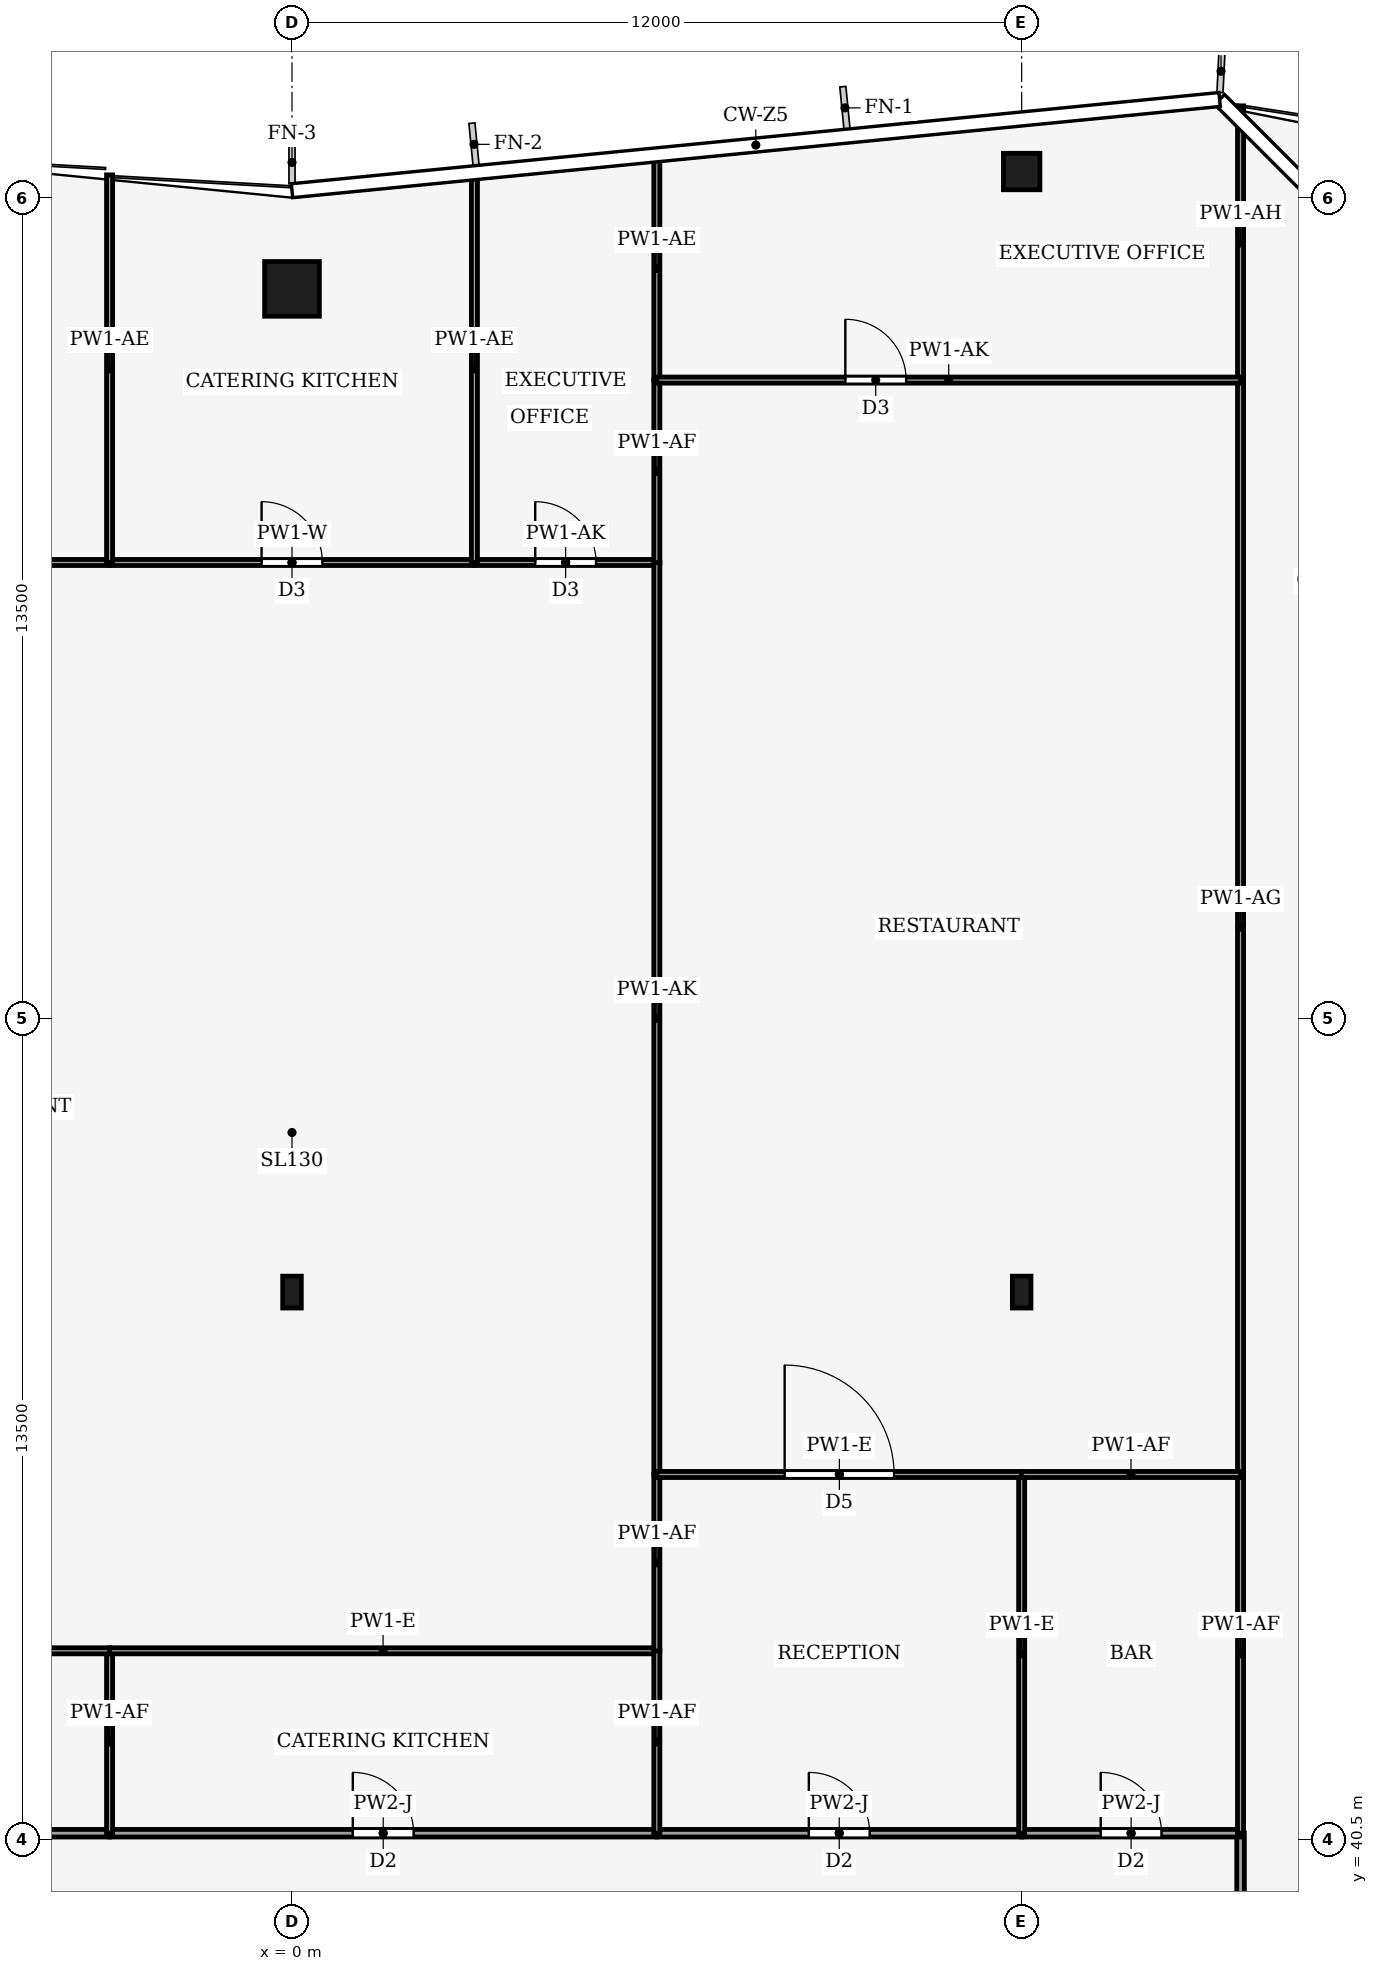
"""IFC4 building model, lengths in metres.
Left out: names, types, materials, properties, quantities, classifications, styles, units other than length and angle.
Written with IfcOpenShell. Run it as: python <this file> out.ifc"""

import sys

from ifc_helpers import new_model, si_unit, direction, frame, frame_2d, origin, origin_2d, place, context, subcontext, project, spatial, rectangle, hollow_rectangle, i_section, extrude, element, fill, save


model = new_model("IFC4")
c1 = context("Model", 3, precision=1e-05, world=origin(), true_north=direction((0.0, 1.0)))
c2 = subcontext(c1, "Body", "Model", "MODEL_VIEW")
j1 = project(units=[si_unit("LENGTHUNIT", "METRE"), si_unit("PLANEANGLEUNIT", "RADIAN")], contexts=[c1])
p1 = place(None, origin())
s1 = spatial("IfcSite", under=j1, at=p1, CompositionType="ELEMENT")
p2 = place(p1, origin())
s2 = spatial("IfcBuilding", under=s1, at=p2, CompositionType="ELEMENT")
p3 = place(p2, frame((0.0, 0.0, 330.0)))
s3 = spatial("IfcBuildingStorey", under=s2, at=p3, CompositionType="ELEMENT", Elevation=330.0)
p4 = place(p3, frame((0.0, 66.0, 0.0), z_axis=(0.0, 0.0, 1.0), x_axis=(1.0, 0.0, 0.0)))
e1 = element("IfcColumn", 1, at=p4, inside=s3, PredefinedType="COLUMN", context=c2, shape_type="SweptSolid", body=[
    extrude(hollow_rectangle(XDim=0.9, YDim=0.9, WallThickness=0.04, at=origin_2d()), origin(), (0.0, 0.0, 1.0), 4.0),
])
p5 = place(p3, frame((12.0, 67.93, 0.0), z_axis=(0.0, 0.0, 1.0), x_axis=(1.0, 0.0, 0.0)))
e2 = element("IfcColumn", 2, at=p5, inside=s3, PredefinedType="COLUMN", context=c2, shape_type="SweptSolid", body=[
    extrude(hollow_rectangle(XDim=0.6, YDim=0.6, WallThickness=0.025, at=origin_2d()), origin(), (0.0, 0.0, 1.0), 4.0),
])
for number, where, z_axis, x_axis in (
    (3, (0.0, 49.5, 0.0), (0.0, 0.0, 1.0), (1.0, 0.0, 0.0)),
    (4, (12.0, 49.5, 0.0), (0.0, 0.0, 1.0), (1.0, 0.0, 0.0)),
):
    element("IfcColumn", number, at=place(p3, frame(where, z_axis=z_axis, x_axis=x_axis)), inside=s3, PredefinedType="COLUMN", context=c2, shape_type="SweptSolid", body=[
        extrude(i_section(OverallWidth=0.306, OverallDepth=0.524, WebThickness=0.012, FlangeThickness=0.04, FilletRadius=0.027, at=origin_2d()), origin(), (0.0, 0.0, 1.0), 4.0),
    ])
p6 = place(p3, frame((15.6, 40.604, 0.0), z_axis=(0.0, 0.0, 1.0), x_axis=(0.0, -1.0, 0.0)))
e5 = element("IfcWall", 5, at=p6, inside=s3, PredefinedType="PARTITIONING", context=c2, shape_type="SweptSolid", body=[
    extrude(rectangle(XDim=6.104, YDim=0.125, at=frame_2d((3.052, 0.0))), origin(), (0.0, 0.0, 1.0), 3.09),
])
p7 = place(p6, frame((2.552, 0.0, 0.0)))
e6 = element("IfcOpeningElement", 6, at=p7, cuts=e5, PredefinedType="OPENING", context=c2, shape_type="SweptSolid", body=[
    extrude(rectangle(XDim=1.0, YDim=2.1, at=frame_2d((0.5, 1.05))), frame((0.0, 0.073, 0.0), z_axis=(0.0, -1.0, 0.0), x_axis=(1.0, 0.0, 0.0)), (0.0, 0.0, 1.0), 0.145),
])
p8 = place(p3, frame((-12.0, 40.6, 0.0), z_axis=(0.0, 0.0, 1.0), x_axis=(1.0, 0.0, 0.0)))
e7 = element("IfcWall", 7, at=p8, inside=s3, PredefinedType="PARTITIONING", context=c2, shape_type="SweptSolid", body=[
    extrude(rectangle(XDim=9.0, YDim=0.125, at=frame_2d((4.5, 0.0))), origin(), (0.0, 0.0, 1.0), 3.34),
])
p9 = place(p8, frame((4.0, 0.0, 0.0)))
e8 = element("IfcOpeningElement", 8, at=p9, cuts=e7, PredefinedType="OPENING", context=c2, shape_type="SweptSolid", body=[
    extrude(rectangle(XDim=1.0, YDim=2.1, at=frame_2d((0.5, 1.05))), frame((0.0, 0.073, 0.0), z_axis=(0.0, -1.0, 0.0), x_axis=(1.0, 0.0, 0.0)), (0.0, 0.0, 1.0), 0.145),
])
p10 = place(p3, frame((-3.0, 40.6, 0.0), z_axis=(0.0, 0.0, 1.0), x_axis=(1.0, 0.0, 0.0)))
e9 = element("IfcWall", 9, at=p10, inside=s3, PredefinedType="PARTITIONING", context=c2, shape_type="SweptSolid", body=[
    extrude(rectangle(XDim=9.0, YDim=0.125, at=frame_2d((4.5, 0.0))), origin(), (0.0, 0.0, 1.0), 3.34),
])
p11 = place(p10, frame((4.0, 0.0, 0.0)))
e10 = element("IfcOpeningElement", 10, at=p11, cuts=e9, PredefinedType="OPENING", context=c2, shape_type="SweptSolid", body=[
    extrude(rectangle(XDim=1.0, YDim=2.1, at=frame_2d((0.5, 1.05))), frame((0.0, 0.073, 0.0), z_axis=(0.0, -1.0, 0.0), x_axis=(1.0, 0.0, 0.0)), (0.0, 0.0, 1.0), 0.145),
])
p12 = place(p3, frame((6.0, 40.6, 0.0), z_axis=(0.0, 0.0, 1.0), x_axis=(1.0, 0.0, 0.0)))
e11 = element("IfcWall", 11, at=p12, inside=s3, PredefinedType="PARTITIONING", context=c2, shape_type="SweptSolid", body=[
    extrude(rectangle(XDim=6.0, YDim=0.125, at=frame_2d((3.0, 0.0))), origin(), (0.0, 0.0, 1.0), 3.34),
])
p13 = place(p12, frame((2.5, 0.0, 0.0)))
e12 = element("IfcOpeningElement", 12, at=p13, cuts=e11, PredefinedType="OPENING", context=c2, shape_type="SweptSolid", body=[
    extrude(rectangle(XDim=1.0, YDim=2.1, at=frame_2d((0.5, 1.05))), frame((0.0, 0.073, 0.0), z_axis=(0.0, -1.0, 0.0), x_axis=(1.0, 0.0, 0.0)), (0.0, 0.0, 1.0), 0.145),
])
p14 = place(p3, frame((12.0, 40.6, 0.0), z_axis=(0.0, 0.0, 1.0), x_axis=(1.0, 0.0, 0.0)))
e13 = element("IfcWall", 13, at=p14, inside=s3, PredefinedType="PARTITIONING", context=c2, shape_type="SweptSolid", body=[
    extrude(rectangle(XDim=3.6, YDim=0.125, at=frame_2d((1.8, 0.0))), origin(), (0.0, 0.0, 1.0), 3.34),
])
p15 = place(p14, frame((1.3, 0.0, 0.0)))
e14 = element("IfcOpeningElement", 14, at=p15, cuts=e13, PredefinedType="OPENING", context=c2, shape_type="SweptSolid", body=[
    extrude(rectangle(XDim=1.0, YDim=2.1, at=frame_2d((0.5, 1.05))), frame((0.0, 0.073, 0.0), z_axis=(0.0, -1.0, 0.0), x_axis=(1.0, 0.0, 0.0)), (0.0, 0.0, 1.0), 0.145),
])
p16 = place(p3, frame((15.6, 46.5, 0.0), z_axis=(0.0, 0.0, 1.0), x_axis=(0.0, -1.0, 0.0)))
e15 = element("IfcWall", 15, at=p16, inside=s3, PredefinedType="PARTITIONING", context=c2, shape_type="SweptSolid", body=[
    extrude(rectangle(XDim=5.9, YDim=0.1, at=frame_2d((2.95, 0.0))), origin(), (0.0, 0.0, 1.0), 3.82),
])
p17 = place(p3, frame((15.6, 64.5, 0.0), z_axis=(0.0, 0.0, 1.0), x_axis=(0.0, -1.0, 0.0)))
e16 = element("IfcWall", 16, at=p17, inside=s3, PredefinedType="PARTITIONING", context=c2, shape_type="SweptSolid", body=[
    extrude(rectangle(XDim=18.0, YDim=0.1, at=frame_2d((9.0, 0.0))), origin(), (0.0, 0.0, 1.0), 3.3),
])
p18 = place(p3, frame((15.6, 69.01, 0.0), z_axis=(0.0, 0.0, 1.0), x_axis=(0.0, -1.0, 0.0)))
e17 = element("IfcWall", 17, at=p18, inside=s3, PredefinedType="PARTITIONING", context=c2, shape_type="SweptSolid", body=[
    extrude(rectangle(XDim=4.51, YDim=0.1, at=frame_2d((2.255, 0.0))), origin(), (0.0, 0.0, 1.0), 2.88),
])
p19 = place(p3, frame((-3.0, 40.6, 0.0), z_axis=(0.0, 0.0, 1.0), x_axis=(0.0, 1.0, 0.0)))
e18 = element("IfcWall", 18, at=p19, inside=s3, PredefinedType="PARTITIONING", context=c2, shape_type="SweptSolid", body=[
    extrude(rectangle(XDim=3.0, YDim=0.1, at=frame_2d((1.5, 0.0))), origin(), (0.0, 0.0, 1.0), 3.82),
])
p20 = place(p3, frame((-2.996, 43.6, 0.0), z_axis=(0.0, 0.0, 1.0), x_axis=(-1.0, 0.0, 0.0)))
e19 = element("IfcWall", 19, at=p20, inside=s3, PredefinedType="PARTITIONING", context=c2, shape_type="SweptSolid", body=[
    extrude(rectangle(XDim=9.008, YDim=0.1, at=frame_2d((4.504, 0.0))), origin(), (0.0, 0.0, 1.0), 3.34),
])
p21 = place(p3, frame((6.0, 43.6, 0.0), z_axis=(0.0, 0.0, 1.0), x_axis=(-1.0, 0.0, 0.0)))
e20 = element("IfcWall", 20, at=p21, inside=s3, PredefinedType="PARTITIONING", context=c2, shape_type="SweptSolid", body=[
    extrude(rectangle(XDim=9.004, YDim=0.1, at=frame_2d((4.502, 0.0))), origin(), (0.0, 0.0, 1.0), 3.34),
])
p22 = place(p3, frame((6.0, 40.6, 0.0), z_axis=(0.0, 0.0, 1.0), x_axis=(0.0, 1.0, 0.0)))
e21 = element("IfcWall", 21, at=p22, inside=s3, PredefinedType="PARTITIONING", context=c2, shape_type="SweptSolid", body=[
    extrude(rectangle(XDim=3.004, YDim=0.1, at=frame_2d((1.502, 0.0))), origin(), (0.0, 0.0, 1.0), 3.82),
])
p23 = place(p3, frame((-12.0, 61.5, 0.0), z_axis=(0.0, 0.0, 1.0), x_axis=(1.0, 0.0, 0.0)))
e22 = element("IfcWall", 22, at=p23, inside=s3, PredefinedType="PARTITIONING", context=c2, shape_type="SweptSolid", body=[
    extrude(rectangle(XDim=9.0, YDim=0.1, at=frame_2d((4.5, 0.0))), origin(), (0.0, 0.0, 1.0), 3.19),
])
p24 = place(p23, frame((4.0, 0.0, 0.0)))
e23 = element("IfcOpeningElement", 23, at=p24, cuts=e22, PredefinedType="OPENING", context=c2, shape_type="SweptSolid", body=[
    extrude(rectangle(XDim=1.0, YDim=2.1, at=frame_2d((0.5, 1.05))), frame((0.0, 0.06, 0.0), z_axis=(0.0, -1.0, 0.0), x_axis=(1.0, 0.0, 0.0)), (0.0, 0.0, 1.0), 0.12),
])
p25 = place(p3, frame((-3.0, 61.5, 0.0), z_axis=(0.0, 0.0, 1.0), x_axis=(1.0, 0.0, 0.0)))
e24 = element("IfcWall", 24, at=p25, inside=s3, PredefinedType="PARTITIONING", context=c2, shape_type="SweptSolid", body=[
    extrude(rectangle(XDim=6.0, YDim=0.1, at=frame_2d((3.0, 0.0))), origin(), (0.0, 0.0, 1.0), 3.24),
])
p26 = place(p25, frame((2.5, 0.0, 0.0)))
e25 = element("IfcOpeningElement", 25, at=p26, cuts=e24, PredefinedType="OPENING", context=c2, shape_type="SweptSolid", body=[
    extrude(rectangle(XDim=1.0, YDim=2.1, at=frame_2d((0.5, 1.05))), frame((0.0, 0.06, 0.0), z_axis=(0.0, -1.0, 0.0), x_axis=(1.0, 0.0, 0.0)), (0.0, 0.0, 1.0), 0.12),
])
p27 = place(p3, frame((3.0, 61.5, 0.0), z_axis=(0.0, 0.0, 1.0), x_axis=(1.0, 0.0, 0.0)))
e26 = element("IfcWall", 26, at=p27, inside=s3, PredefinedType="PARTITIONING", context=c2, shape_type="SweptSolid", body=[
    extrude(rectangle(XDim=3.0, YDim=0.1, at=frame_2d((1.5, 0.0))), origin(), (0.0, 0.0, 1.0), 3.19),
])
p28 = place(p27, frame((1.0, 0.0, 0.0)))
e27 = element("IfcOpeningElement", 27, at=p28, cuts=e26, PredefinedType="OPENING", context=c2, shape_type="SweptSolid", body=[
    extrude(rectangle(XDim=1.0, YDim=2.1, at=frame_2d((0.5, 1.05))), frame((0.0, 0.06, 0.0), z_axis=(0.0, -1.0, 0.0), x_axis=(1.0, 0.0, 0.0)), (0.0, 0.0, 1.0), 0.12),
])
p29 = place(p3, frame((6.0, 43.596, 0.0), z_axis=(0.0, 0.0, 1.0), x_axis=(0.0, 1.0, 0.0)))
e28 = element("IfcWall", 28, at=p29, inside=s3, PredefinedType="PARTITIONING", context=c2, shape_type="SweptSolid", body=[
    extrude(rectangle(XDim=2.904, YDim=0.1, at=frame_2d((1.452, 0.0))), origin(), (0.0, 0.0, 1.0), 3.82),
])
p30 = place(p3, frame((6.0, 46.5, 0.0), z_axis=(0.0, 0.0, 1.0), x_axis=(0.0, 1.0, 0.0)))
e29 = element("IfcWall", 29, at=p30, inside=s3, PredefinedType="PARTITIONING", context=c2, shape_type="SweptSolid", body=[
    extrude(rectangle(XDim=15.004, YDim=0.1, at=frame_2d((7.502, 0.0))), origin(), (0.0, 0.0, 1.0), 3.19),
])
for number, where, z_axis, x_axis in (
    (30, (-3.0, 61.5, 0.0), (0.0, 0.0, 1.0), (0.0, 1.0, 0.0)),
    (31, (3.0, 61.5, 0.0), (0.0, 0.0, 1.0), (0.0, 1.0, 0.0)),
):
    element("IfcWall", number, at=place(p3, frame(where, z_axis=z_axis, x_axis=x_axis)), inside=s3, PredefinedType="PARTITIONING", context=c2, shape_type="SweptSolid", body=[
        extrude(rectangle(XDim=6.375, YDim=0.1, at=frame_2d((3.188, 0.0))), origin(), (0.0, 0.0, 1.0), 2.99),
    ])
p31 = place(p3, frame((6.0, 61.496, 0.0), z_axis=(0.0, 0.0, 1.0), x_axis=(0.0, 1.0, 0.0)))
e32 = element("IfcWall", 32, at=p31, inside=s3, PredefinedType="PARTITIONING", context=c2, shape_type="SweptSolid", body=[
    extrude(rectangle(XDim=3.004, YDim=0.1, at=frame_2d((1.502, 0.0))), origin(), (0.0, 0.0, 1.0), 3.82),
])
p32 = place(p3, frame((6.0, 64.5, 0.0), z_axis=(0.0, 0.0, 1.0), x_axis=(0.0, 1.0, 0.0)))
e33 = element("IfcWall", 33, at=p32, inside=s3, PredefinedType="PARTITIONING", context=c2, shape_type="SweptSolid", body=[
    extrude(rectangle(XDim=3.67, YDim=0.1, at=frame_2d((1.835, 0.0))), origin(), (0.0, 0.0, 1.0), 2.99),
])
p33 = place(p3, frame((12.0, 40.6, 0.0), z_axis=(0.0, 0.0, 1.0), x_axis=(0.0, 1.0, 0.0)))
e34 = element("IfcWall", 34, at=p33, inside=s3, PredefinedType="PARTITIONING", context=c2, shape_type="SweptSolid", body=[
    extrude(rectangle(XDim=5.9, YDim=0.1, at=frame_2d((2.95, 0.0))), origin(), (0.0, 0.0, 1.0), 3.34),
])
p34 = place(p3, frame((6.0, 46.5, 0.0), z_axis=(0.0, 0.0, 1.0), x_axis=(1.0, 0.0, 0.0)))
e35 = element("IfcWall", 35, at=p34, inside=s3, PredefinedType="PARTITIONING", context=c2, shape_type="SweptSolid", body=[
    extrude(rectangle(XDim=6.004, YDim=0.1, at=frame_2d((3.002, 0.0))), origin(), (0.0, 0.0, 1.0), 3.34),
])
p35 = place(p34, frame((2.102, 0.0, 0.0)))
e36 = element("IfcOpeningElement", 36, at=p35, cuts=e35, PredefinedType="OPENING", context=c2, shape_type="SweptSolid", body=[
    extrude(rectangle(XDim=1.8, YDim=2.1, at=frame_2d((0.9, 1.05))), frame((0.0, 0.06, 0.0), z_axis=(0.0, -1.0, 0.0), x_axis=(1.0, 0.0, 0.0)), (0.0, 0.0, 1.0), 0.12),
])
p36 = place(p3, frame((15.6, 46.5, 0.0), z_axis=(0.0, 0.0, 1.0), x_axis=(-1.0, 0.0, 0.0)))
e37 = element("IfcWall", 37, at=p36, inside=s3, PredefinedType="PARTITIONING", context=c2, shape_type="SweptSolid", body=[
    extrude(rectangle(XDim=3.604, YDim=0.1, at=frame_2d((1.802, 0.0))), origin(), (0.0, 0.0, 1.0), 3.82),
])
p37 = place(p3, frame((6.0, 64.5, 0.0), z_axis=(0.0, 0.0, 1.0), x_axis=(1.0, 0.0, 0.0)))
e38 = element("IfcWall", 38, at=p37, inside=s3, PredefinedType="PARTITIONING", context=c2, shape_type="SweptSolid", body=[
    extrude(rectangle(XDim=9.6, YDim=0.1, at=frame_2d((4.8, 0.0))), origin(), (0.0, 0.0, 1.0), 3.19),
])
p38 = place(p37, frame((3.1, 0.0, 0.0)))
e39 = element("IfcOpeningElement", 39, at=p38, cuts=e38, PredefinedType="OPENING", context=c2, shape_type="SweptSolid", body=[
    extrude(rectangle(XDim=1.0, YDim=2.1, at=frame_2d((0.5, 1.05))), frame((0.0, 0.06, 0.0), z_axis=(0.0, -1.0, 0.0), x_axis=(1.0, 0.0, 0.0)), (0.0, 0.0, 1.0), 0.12),
])
p39 = place(p11, origin())
e40 = element("IfcDoor", 40, at=p39, inside=s3, OperationType="SINGLE_SWING_LEFT", PredefinedType="DOOR", context=c2, shape_type="SweptSolid", body=[
    extrude(rectangle(XDim=1.0, YDim=2.1, at=frame_2d((0.5, 1.05))), frame((0.0, 0.025, 0.0), z_axis=(0.0, -1.0, 0.0), x_axis=(1.0, 0.0, 0.0)), (0.0, 0.0, 1.0), 0.05),
])
fill(e10, e40)
p40 = place(p13, origin())
e41 = element("IfcDoor", 41, at=p40, inside=s3, OperationType="SINGLE_SWING_RIGHT", PredefinedType="DOOR", context=c2, shape_type="SweptSolid", body=[
    extrude(rectangle(XDim=1.0, YDim=2.1, at=frame_2d((0.5, 1.05))), frame((0.0, 0.025, 0.0), z_axis=(0.0, -1.0, 0.0), x_axis=(1.0, 0.0, 0.0)), (0.0, 0.0, 1.0), 0.05),
])
fill(e12, e41)
p41 = place(p15, origin())
e42 = element("IfcDoor", 42, at=p41, inside=s3, OperationType="SINGLE_SWING_LEFT", PredefinedType="DOOR", context=c2, shape_type="SweptSolid", body=[
    extrude(rectangle(XDim=1.0, YDim=2.1, at=frame_2d((0.5, 1.05))), frame((0.0, 0.025, 0.0), z_axis=(0.0, -1.0, 0.0), x_axis=(1.0, 0.0, 0.0)), (0.0, 0.0, 1.0), 0.05),
])
fill(e14, e42)
p42 = place(p26, origin())
e43 = element("IfcDoor", 43, at=p42, inside=s3, OperationType="SINGLE_SWING_LEFT", PredefinedType="DOOR", context=c2, shape_type="SweptSolid", body=[
    extrude(rectangle(XDim=1.0, YDim=2.1, at=frame_2d((0.5, 1.05))), frame((0.0, 0.025, 0.0), z_axis=(0.0, -1.0, 0.0), x_axis=(1.0, 0.0, 0.0)), (0.0, 0.0, 1.0), 0.05),
])
fill(e25, e43)
p43 = place(p28, origin())
e44 = element("IfcDoor", 44, at=p43, inside=s3, OperationType="SINGLE_SWING_RIGHT", PredefinedType="DOOR", context=c2, shape_type="SweptSolid", body=[
    extrude(rectangle(XDim=1.0, YDim=2.1, at=frame_2d((0.5, 1.05))), frame((0.0, 0.025, 0.0), z_axis=(0.0, -1.0, 0.0), x_axis=(1.0, 0.0, 0.0)), (0.0, 0.0, 1.0), 0.05),
])
fill(e27, e44)
p44 = place(p35, origin())
e45 = element("IfcDoor", 45, at=p44, inside=s3, OperationType="DOUBLE_DOOR_SINGLE_SWING", PredefinedType="DOOR", context=c2, shape_type="SweptSolid", body=[
    extrude(rectangle(XDim=1.8, YDim=2.1, at=frame_2d((0.9, 1.05))), frame((0.0, 0.025, 0.0), z_axis=(0.0, -1.0, 0.0), x_axis=(1.0, 0.0, 0.0)), (0.0, 0.0, 1.0), 0.05),
])
fill(e36, e45)
p45 = place(p38, origin())
e46 = element("IfcDoor", 46, at=p45, inside=s3, OperationType="SINGLE_SWING_LEFT", PredefinedType="DOOR", context=c2, shape_type="SweptSolid", body=[
    extrude(rectangle(XDim=1.0, YDim=2.1, at=frame_2d((0.5, 1.05))), frame((0.0, 0.025, 0.0), z_axis=(0.0, -1.0, 0.0), x_axis=(1.0, 0.0, 0.0)), (0.0, 0.0, 1.0), 0.05),
])
fill(e39, e46)
save(model, sys.argv[1])
